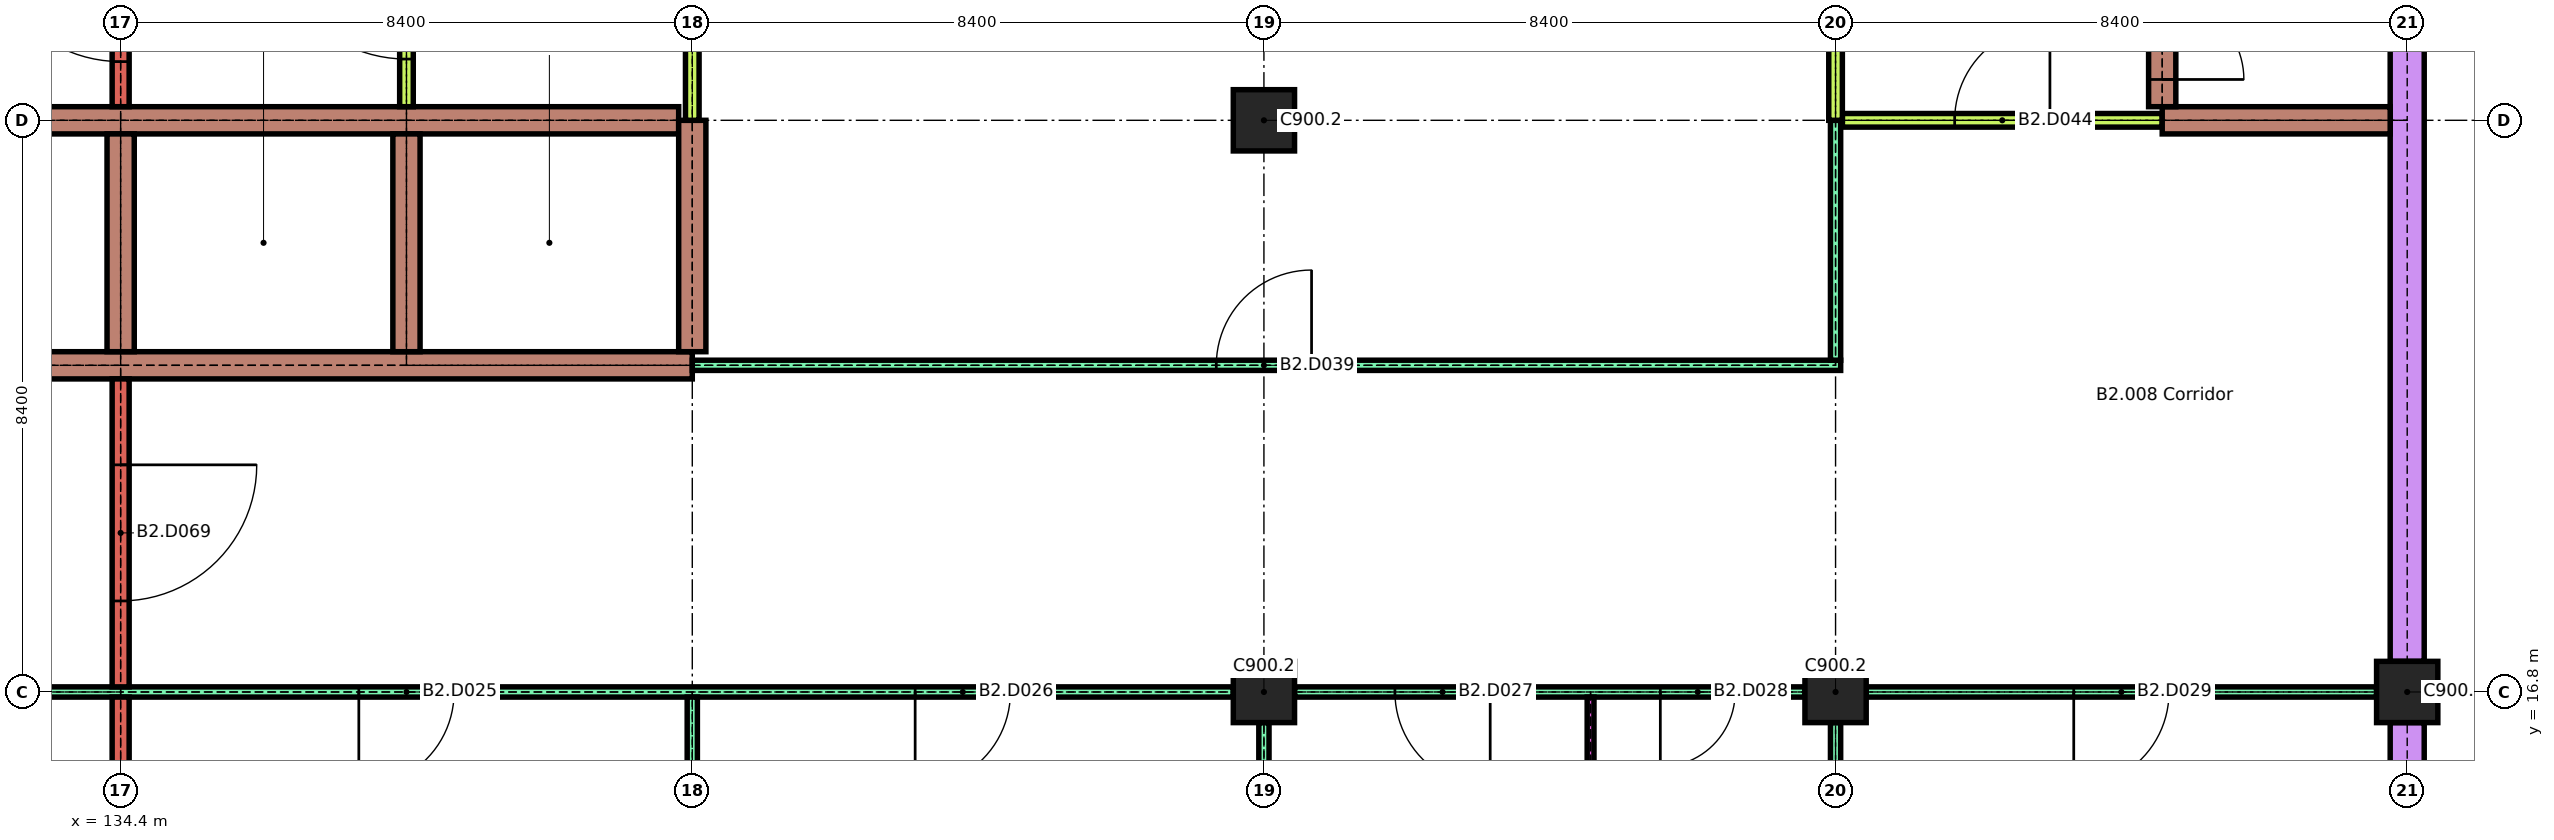
"""IFC4 building model, lengths in metres.
Left out: names, types, materials, properties, quantities, classifications, styles, units other than length and angle.
Written with IfcOpenShell. Run it as: python <this file> out.ifc"""

import sys

from ifc_helpers import new_model, si_unit, direction, frame, frame_2d, origin, origin_2d, place, context, subcontext, project, spatial, rectangle, extrude, element, fill, save


model = new_model("IFC4")
c1 = context("Model", 3, precision=1e-05, world=origin(), true_north=direction((0.0, 1.0)))
c2 = subcontext(c1, "Body", "Model", "MODEL_VIEW")
j1 = project(units=[si_unit("LENGTHUNIT", "METRE"), si_unit("PLANEANGLEUNIT", "RADIAN")], contexts=[c1])
p1 = place(None, origin())
s1 = spatial("IfcSite", under=j1, at=p1, CompositionType="ELEMENT")
p2 = place(p1, origin())
s2 = spatial("IfcBuilding", under=s1, at=p2, CompositionType="ELEMENT")
p3 = place(p2, frame((0.0, 0.0, -7.8)))
s3 = spatial("IfcBuildingStorey", under=s2, at=p3, CompositionType="ELEMENT", Elevation=-7.8)
for number, where, z_axis, x_axis in (
    (1, (151.2, 16.8, 0.0), (0.0, 0.0, 1.0), (1.0, 0.0, 0.0)),
    (2, (159.6, 16.8, 0.0), (0.0, 0.0, 1.0), (1.0, 0.0, 0.0)),
    (3, (168.0, 16.8, 0.0), (0.0, 0.0, 1.0), (1.0, 0.0, 0.0)),
    (4, (151.2, 25.2, 0.0), (0.0, 0.0, 1.0), (1.0, 0.0, 0.0)),
):
    element("IfcColumn", number, at=place(p3, frame(where, z_axis=z_axis, x_axis=x_axis)), inside=s3, PredefinedType="COLUMN", context=c2, shape_type="SweptSolid", body=[
        extrude(rectangle(XDim=0.9, YDim=0.9, at=origin_2d()), origin(), (0.0, 0.0, 1.0), 3.1),
    ])
p4 = place(p3, frame((168.0, 8.85, 0.0), z_axis=(0.0, 0.0, 1.0), x_axis=(0.0, 1.0, 0.0)))
e5 = element("IfcWall", 5, at=p4, inside=s3, PredefinedType="SOLIDWALL", context=c2, shape_type="SweptSolid", body=[
    extrude(rectangle(XDim=7.5, YDim=0.5, at=frame_2d((3.75, 0.0))), origin(), (0.0, 0.0, 1.0), 3.1),
])
p5 = place(p3, frame((168.0, 17.25, 0.0), z_axis=(0.0, 0.0, 1.0), x_axis=(0.0, 1.0, 0.0)))
e6 = element("IfcWall", 6, at=p5, inside=s3, PredefinedType="SOLIDWALL", context=c2, shape_type="SweptSolid", body=[
    extrude(rectangle(XDim=16.6, YDim=0.5, at=frame_2d((8.3, 0.0))), origin(), (0.0, 0.0, 1.0), 3.1),
])
p6 = place(p3, frame((126.0, 16.8, 0.0), z_axis=(0.0, 0.0, 1.0), x_axis=(1.0, 0.0, 0.0)))
e7 = element("IfcWall", 7, at=p6, inside=s3, PredefinedType="PARTITIONING", context=c2, shape_type="SweptSolid", body=[
    extrude(rectangle(XDim=24.75, YDim=0.15, at=frame_2d((12.375, 0.0))), origin(), (0.0, 0.0, 1.0), 3.1),
])
p7 = place(p6, frame((3.5, 0.0, 0.0)))
e8 = element("IfcOpeningElement", 8, at=p7, cuts=e7, PredefinedType="OPENING", context=c2, shape_type="SweptSolid", body=[
    extrude(rectangle(XDim=1.4, YDim=2.1, at=frame_2d((0.7, 1.05))), frame((0.0, 0.085, 0.0), z_axis=(0.0, -1.0, 0.0), x_axis=(1.0, 0.0, 0.0)), (0.0, 0.0, 1.0), 0.17),
])
p8 = place(p6, frame((11.9, 0.0, 0.0)))
e9 = element("IfcOpeningElement", 9, at=p8, cuts=e7, PredefinedType="OPENING", context=c2, shape_type="SweptSolid", body=[
    extrude(rectangle(XDim=1.4, YDim=2.1, at=frame_2d((0.7, 1.05))), frame((0.0, 0.085, 0.0), z_axis=(0.0, -1.0, 0.0), x_axis=(1.0, 0.0, 0.0)), (0.0, 0.0, 1.0), 0.17),
])
p9 = place(p6, frame((20.075, 0.0, 0.0)))
e10 = element("IfcOpeningElement", 10, at=p9, cuts=e7, PredefinedType="OPENING", context=c2, shape_type="SweptSolid", body=[
    extrude(rectangle(XDim=1.4, YDim=2.1, at=frame_2d((0.7, 1.05))), frame((0.0, 0.085, 0.0), z_axis=(0.0, -1.0, 0.0), x_axis=(1.0, 0.0, 0.0)), (0.0, 0.0, 1.0), 0.17),
])
p10 = place(p3, frame((151.65, 16.8, 0.0), z_axis=(0.0, 0.0, 1.0), x_axis=(1.0, 0.0, 0.0)))
e11 = element("IfcWall", 11, at=p10, inside=s3, PredefinedType="PARTITIONING", context=c2, shape_type="SweptSolid", body=[
    extrude(rectangle(XDim=7.5, YDim=0.15, at=frame_2d((3.75, 0.0))), origin(), (0.0, 0.0, 1.0), 3.1),
])
p11 = place(p10, frame((1.475, 0.0, 0.0)))
e12 = element("IfcOpeningElement", 12, at=p11, cuts=e11, PredefinedType="OPENING", context=c2, shape_type="SweptSolid", body=[
    extrude(rectangle(XDim=1.4, YDim=2.1, at=frame_2d((0.7, 1.05))), frame((0.0, 0.085, 0.0), z_axis=(0.0, -1.0, 0.0), x_axis=(1.0, 0.0, 0.0)), (0.0, 0.0, 1.0), 0.17),
])
p12 = place(p10, frame((5.375, 0.0, 0.0)))
e13 = element("IfcOpeningElement", 13, at=p12, cuts=e11, PredefinedType="OPENING", context=c2, shape_type="SweptSolid", body=[
    extrude(rectangle(XDim=1.1, YDim=2.1, at=frame_2d((0.55, 1.05))), frame((0.0, 0.085, 0.0), z_axis=(0.0, -1.0, 0.0), x_axis=(1.0, 0.0, 0.0)), (0.0, 0.0, 1.0), 0.17),
])
p13 = place(p3, frame((160.05, 16.8, 0.0), z_axis=(0.0, 0.0, 1.0), x_axis=(1.0, 0.0, 0.0)))
e14 = element("IfcWall", 14, at=p13, inside=s3, PredefinedType="PARTITIONING", context=c2, shape_type="SweptSolid", body=[
    extrude(rectangle(XDim=7.5, YDim=0.15, at=frame_2d((3.75, 0.0))), origin(), (0.0, 0.0, 1.0), 3.1),
])
p14 = place(p13, frame((3.05, 0.0, 0.0)))
e15 = element("IfcOpeningElement", 15, at=p14, cuts=e14, PredefinedType="OPENING", context=c2, shape_type="SweptSolid", body=[
    extrude(rectangle(XDim=1.4, YDim=2.1, at=frame_2d((0.7, 1.05))), frame((0.0, 0.085, 0.0), z_axis=(0.0, -1.0, 0.0), x_axis=(1.0, 0.0, 0.0)), (0.0, 0.0, 1.0), 0.17),
])
p15 = place(p3, frame((117.8, 21.6, 0.0), z_axis=(0.0, 0.0, 1.0), x_axis=(1.0, 0.0, 0.0)))
e16 = element("IfcWall", 16, at=p15, inside=s3, PredefinedType="SHEAR", context=c2, shape_type="SweptSolid", body=[
    extrude(rectangle(XDim=25.0, YDim=0.4, at=frame_2d((12.5, 0.0))), origin(), (0.0, 0.0, 1.0), 3.1),
])
p16 = place(p15, frame((1.45, 0.0, 0.0)))
e17 = element("IfcOpeningElement", 17, at=p16, cuts=e16, PredefinedType="OPENING", context=c2, shape_type="SweptSolid", body=[
    extrude(rectangle(XDim=1.1, YDim=2.1, at=frame_2d((0.55, 1.05))), frame((0.0, 0.21, 0.0), z_axis=(0.0, -1.0, 0.0), x_axis=(1.0, 0.0, 0.0)), (0.0, 0.0, 1.0), 0.42),
])
p17 = place(p15, frame((5.55, 0.0, 0.0)))
e18 = element("IfcOpeningElement", 18, at=p17, cuts=e16, PredefinedType="OPENING", context=c2, shape_type="SweptSolid", body=[
    extrude(rectangle(XDim=1.1, YDim=2.1, at=frame_2d((0.55, 1.05))), frame((0.0, 0.21, 0.0), z_axis=(0.0, -1.0, 0.0), x_axis=(1.0, 0.0, 0.0)), (0.0, 0.0, 1.0), 0.42),
])
p18 = place(p3, frame((142.8, 21.6, 0.0), z_axis=(0.0, 0.0, 1.0), x_axis=(1.0, 0.0, 0.0)))
e19 = element("IfcWall", 19, at=p18, inside=s3, PredefinedType="PARTITIONING", context=c2, shape_type="SweptSolid", body=[
    extrude(rectangle(XDim=16.875, YDim=0.15, at=frame_2d((8.438, 0.0))), origin(), (0.0, 0.0, 1.0), 3.1),
])
p19 = place(p18, frame((7.7, 0.0, 0.0)))
e20 = element("IfcOpeningElement", 20, at=p19, cuts=e19, PredefinedType="OPENING", context=c2, shape_type="SweptSolid", body=[
    extrude(rectangle(XDim=1.4, YDim=2.1, at=frame_2d((0.7, 1.05))), frame((0.0, 0.085, 0.0), z_axis=(0.0, -1.0, 0.0), x_axis=(1.0, 0.0, 0.0)), (0.0, 0.0, 1.0), 0.17),
])
p20 = place(p3, frame((117.8, 25.2, 0.0), z_axis=(0.0, 0.0, 1.0), x_axis=(1.0, 0.0, 0.0)))
e21 = element("IfcWall", 21, at=p20, inside=s3, PredefinedType="SHEAR", context=c2, shape_type="SweptSolid", body=[
    extrude(rectangle(XDim=24.8, YDim=0.4, at=frame_2d((12.4, 0.0))), origin(), (0.0, 0.0, 1.0), 3.1),
])
p21 = place(p3, frame((159.7, 25.2, 0.0), z_axis=(0.0, 0.0, 1.0), x_axis=(1.0, 0.0, 0.0)))
e22 = element("IfcWall", 22, at=p21, inside=s3, PredefinedType="PARTITIONING", context=c2, shape_type="SweptSolid", body=[
    extrude(rectangle(XDim=4.7, YDim=0.2, at=frame_2d((2.35, 0.0))), origin(), (0.0, 0.0, 1.0), 3.1),
])
p22 = place(p21, frame((1.65, 0.0, 0.0)))
e23 = element("IfcOpeningElement", 23, at=p22, cuts=e22, PredefinedType="OPENING", context=c2, shape_type="SweptSolid", body=[
    extrude(rectangle(XDim=1.4, YDim=2.1, at=frame_2d((0.7, 1.05))), frame((0.0, 0.11, 0.0), z_axis=(0.0, -1.0, 0.0), x_axis=(1.0, 0.0, 0.0)), (0.0, 0.0, 1.0), 0.22),
])
p23 = place(p3, frame((164.4, 25.2, 0.0), z_axis=(0.0, 0.0, 1.0), x_axis=(1.0, 0.0, 0.0)))
e24 = element("IfcWall", 24, at=p23, inside=s3, PredefinedType="SHEAR", context=c2, shape_type="SweptSolid", body=[
    extrude(rectangle(XDim=3.35, YDim=0.4, at=frame_2d((1.675, 0.0))), origin(), (0.0, 0.0, 1.0), 3.1),
])
p24 = place(p3, frame((134.4, 8.85, 0.0), z_axis=(0.0, 0.0, 1.0), x_axis=(0.0, 1.0, 0.0)))
e25 = element("IfcWall", 25, at=p24, inside=s3, PredefinedType="SOLIDWALL", context=c2, shape_type="SweptSolid", body=[
    extrude(rectangle(XDim=7.875, YDim=0.25, at=frame_2d((3.938, 0.0))), origin(), (0.0, 0.0, 1.0), 3.1),
])
p25 = place(p3, frame((134.4, 16.875, 0.0), z_axis=(0.0, 0.0, 1.0), x_axis=(0.0, 1.0, 0.0)))
e26 = element("IfcWall", 26, at=p25, inside=s3, PredefinedType="SOLIDWALL", context=c2, shape_type="SweptSolid", body=[
    extrude(rectangle(XDim=4.525, YDim=0.25, at=frame_2d((2.262, 0.0))), origin(), (0.0, 0.0, 1.0), 3.1),
])
p26 = place(p25, frame((1.262, 0.0, 0.0)))
e27 = element("IfcOpeningElement", 27, at=p26, cuts=e26, PredefinedType="OPENING", context=c2, shape_type="SweptSolid", body=[
    extrude(rectangle(XDim=2.0, YDim=2.4, at=frame_2d((1.0, 1.2))), frame((0.0, 0.135, 0.0), z_axis=(0.0, -1.0, 0.0), x_axis=(1.0, 0.0, 0.0)), (0.0, 0.0, 1.0), 0.27),
])
p27 = place(p3, frame((134.4, 21.8, 0.0), z_axis=(0.0, 0.0, 1.0), x_axis=(0.0, 1.0, 0.0)))
e28 = element("IfcWall", 28, at=p27, inside=s3, PredefinedType="SHEAR", context=c2, shape_type="SweptSolid", body=[
    extrude(rectangle(XDim=3.2, YDim=0.4, at=frame_2d((1.6, 0.0))), origin(), (0.0, 0.0, 1.0), 3.1),
])
p28 = place(p3, frame((134.4, 25.4, 0.0), z_axis=(0.0, 0.0, 1.0), x_axis=(0.0, 1.0, 0.0)))
e29 = element("IfcWall", 29, at=p28, inside=s3, PredefinedType="SOLIDWALL", context=c2, shape_type="SweptSolid", body=[
    extrude(rectangle(XDim=3.325, YDim=0.25, at=frame_2d((1.663, 0.0))), origin(), (0.0, 0.0, 1.0), 3.1),
])
p29 = place(p28, frame((0.663, 0.0, 0.0)))
e30 = element("IfcOpeningElement", 30, at=p29, cuts=e29, PredefinedType="OPENING", context=c2, shape_type="SweptSolid", body=[
    extrude(rectangle(XDim=2.0, YDim=2.4, at=frame_2d((1.0, 1.2))), frame((0.0, 0.135, 0.0), z_axis=(0.0, -1.0, 0.0), x_axis=(1.0, 0.0, 0.0)), (0.0, 0.0, 1.0), 0.27),
])
p30 = place(p3, frame((138.6, 21.8, 0.0), z_axis=(0.0, 0.0, 1.0), x_axis=(0.0, 1.0, 0.0)))
e31 = element("IfcWall", 31, at=p30, inside=s3, PredefinedType="SHEAR", context=c2, shape_type="SweptSolid", body=[
    extrude(rectangle(XDim=3.2, YDim=0.4, at=frame_2d((1.6, 0.0))), origin(), (0.0, 0.0, 1.0), 3.1),
])
p31 = place(p3, frame((138.6, 25.4, 0.0), z_axis=(0.0, 0.0, 1.0), x_axis=(0.0, 1.0, 0.0)))
e32 = element("IfcWall", 32, at=p31, inside=s3, PredefinedType="PARTITIONING", context=c2, shape_type="SweptSolid", body=[
    extrude(rectangle(XDim=4.6, YDim=0.2, at=frame_2d((2.3, 0.0))), origin(), (0.0, 0.0, 1.0), 3.1),
])
p32 = place(p31, frame((0.7, 0.0, 0.0)))
e33 = element("IfcOpeningElement", 33, at=p32, cuts=e32, PredefinedType="OPENING", context=c2, shape_type="SweptSolid", body=[
    extrude(rectangle(XDim=2.0, YDim=2.4, at=frame_2d((1.0, 1.2))), frame((0.0, 0.11, 0.0), z_axis=(0.0, -1.0, 0.0), x_axis=(1.0, 0.0, 0.0)), (0.0, 0.0, 1.0), 0.22),
])
p33 = place(p3, frame((142.8, 8.85, 0.0), z_axis=(0.0, 0.0, 1.0), x_axis=(0.0, 1.0, 0.0)))
e34 = element("IfcWall", 34, at=p33, inside=s3, PredefinedType="PARTITIONING", context=c2, shape_type="SweptSolid", body=[
    extrude(rectangle(XDim=7.875, YDim=0.15, at=frame_2d((3.938, 0.0))), origin(), (0.0, 0.0, 1.0), 3.1),
])
p34 = place(p3, frame((142.8, 21.8, 0.0), z_axis=(0.0, 0.0, 1.0), x_axis=(0.0, 1.0, 0.0)))
e35 = element("IfcWall", 35, at=p34, inside=s3, PredefinedType="SHEAR", context=c2, shape_type="SweptSolid", body=[
    extrude(rectangle(XDim=3.4, YDim=0.4, at=frame_2d((1.7, 0.0))), origin(), (0.0, 0.0, 1.0), 3.1),
])
p35 = place(p3, frame((142.8, 25.2, 0.0), z_axis=(0.0, 0.0, 1.0), x_axis=(0.0, 1.0, 0.0)))
e36 = element("IfcWall", 36, at=p35, inside=s3, PredefinedType="PARTITIONING", context=c2, shape_type="SweptSolid", body=[
    extrude(rectangle(XDim=4.8, YDim=0.2, at=frame_2d((2.4, 0.0))), origin(), (0.0, 0.0, 1.0), 3.1),
])
p36 = place(p3, frame((151.2, 8.85, 0.0), z_axis=(0.0, 0.0, 1.0), x_axis=(0.0, 1.0, 0.0)))
e37 = element("IfcWall", 37, at=p36, inside=s3, PredefinedType="PARTITIONING", context=c2, shape_type="SweptSolid", body=[
    extrude(rectangle(XDim=7.5, YDim=0.15, at=frame_2d((3.75, 0.0))), origin(), (0.0, 0.0, 1.0), 3.1),
])
p37 = place(p3, frame((156.0, 13.25, 0.0), z_axis=(0.0, 0.0, 1.0), x_axis=(0.0, 1.0, 0.0)))
e38 = element("IfcWall", 38, at=p37, inside=s3, PredefinedType="PARTITIONING", context=c2, shape_type="SweptSolid", body=[
    extrude(rectangle(XDim=3.475, YDim=0.1, at=frame_2d((1.738, 0.0))), origin(), (0.0, 0.0, 1.0), 3.1),
])
p38 = place(p3, frame((159.6, 8.85, 0.0), z_axis=(0.0, 0.0, 1.0), x_axis=(0.0, 1.0, 0.0)))
e39 = element("IfcWall", 39, at=p38, inside=s3, PredefinedType="PARTITIONING", context=c2, shape_type="SweptSolid", body=[
    extrude(rectangle(XDim=7.5, YDim=0.15, at=frame_2d((3.75, 0.0))), origin(), (0.0, 0.0, 1.0), 3.1),
])
p39 = place(p3, frame((159.6, 21.675, 0.0), z_axis=(0.0, 0.0, 1.0), x_axis=(0.0, 1.0, 0.0)))
e40 = element("IfcWall", 40, at=p39, inside=s3, PredefinedType="PARTITIONING", context=c2, shape_type="SweptSolid", body=[
    extrude(rectangle(XDim=3.525, YDim=0.15, at=frame_2d((1.762, 0.0))), origin(), (0.0, 0.0, 1.0), 3.1),
])
p40 = place(p3, frame((159.6, 25.2, 0.0), z_axis=(0.0, 0.0, 1.0), x_axis=(0.0, 1.0, 0.0)))
e41 = element("IfcWall", 41, at=p40, inside=s3, PredefinedType="PARTITIONING", context=c2, shape_type="SweptSolid", body=[
    extrude(rectangle(XDim=8.15, YDim=0.2, at=frame_2d((4.075, 0.0))), origin(), (0.0, 0.0, 1.0), 3.1),
])
p41 = place(p3, frame((164.4, 25.4, 0.0), z_axis=(0.0, 0.0, 1.0), x_axis=(0.0, 1.0, 0.0)))
e42 = element("IfcWall", 42, at=p41, inside=s3, PredefinedType="SHEAR", context=c2, shape_type="SweptSolid", body=[
    extrude(rectangle(XDim=7.95, YDim=0.4, at=frame_2d((3.975, 0.0))), origin(), (0.0, 0.0, 1.0), 3.1),
])
p42 = place(p41, frame((0.4, 0.0, 0.0)))
e43 = element("IfcOpeningElement", 43, at=p42, cuts=e42, PredefinedType="OPENING", context=c2, shape_type="SweptSolid", body=[
    extrude(rectangle(XDim=1.2, YDim=2.1, at=frame_2d((0.6, 1.05))), frame((0.0, 0.21, 0.0), z_axis=(0.0, -1.0, 0.0), x_axis=(1.0, 0.0, 0.0)), (0.0, 0.0, 1.0), 0.42),
])
p43 = place(p8, origin())
e44 = element("IfcDoor", 44, at=p43, inside=s3, OperationType="SINGLE_SWING_LEFT", PredefinedType="DOOR", context=c2, shape_type="SweptSolid", body=[
    extrude(rectangle(XDim=1.4, YDim=2.1, at=frame_2d((0.7, 1.05))), frame((0.0, 0.025, 0.0), z_axis=(0.0, -1.0, 0.0), x_axis=(1.0, 0.0, 0.0)), (0.0, 0.0, 1.0), 0.05),
])
fill(e9, e44)
p44 = place(p9, origin())
e45 = element("IfcDoor", 45, at=p44, inside=s3, OperationType="SINGLE_SWING_LEFT", PredefinedType="DOOR", context=c2, shape_type="SweptSolid", body=[
    extrude(rectangle(XDim=1.4, YDim=2.1, at=frame_2d((0.7, 1.05))), frame((0.0, 0.025, 0.0), z_axis=(0.0, -1.0, 0.0), x_axis=(1.0, 0.0, 0.0)), (0.0, 0.0, 1.0), 0.05),
])
fill(e10, e45)
p45 = place(p11, origin())
e46 = element("IfcDoor", 46, at=p45, inside=s3, OperationType="SINGLE_SWING_RIGHT", PredefinedType="DOOR", context=c2, shape_type="SweptSolid", body=[
    extrude(rectangle(XDim=1.4, YDim=2.1, at=frame_2d((0.7, 1.05))), frame((0.0, 0.025, 0.0), z_axis=(0.0, -1.0, 0.0), x_axis=(1.0, 0.0, 0.0)), (0.0, 0.0, 1.0), 0.05),
])
fill(e12, e46)
p46 = place(p12, origin())
e47 = element("IfcDoor", 47, at=p46, inside=s3, OperationType="SINGLE_SWING_LEFT", PredefinedType="DOOR", context=c2, shape_type="SweptSolid", body=[
    extrude(rectangle(XDim=1.1, YDim=2.1, at=frame_2d((0.55, 1.05))), frame((0.0, 0.025, 0.0), z_axis=(0.0, -1.0, 0.0), x_axis=(1.0, 0.0, 0.0)), (0.0, 0.0, 1.0), 0.05),
])
fill(e13, e47)
p47 = place(p14, origin())
e48 = element("IfcDoor", 48, at=p47, inside=s3, OperationType="SINGLE_SWING_LEFT", PredefinedType="DOOR", context=c2, shape_type="SweptSolid", body=[
    extrude(rectangle(XDim=1.4, YDim=2.1, at=frame_2d((0.7, 1.05))), frame((0.0, 0.025, 0.0), z_axis=(0.0, -1.0, 0.0), x_axis=(1.0, 0.0, 0.0)), (0.0, 0.0, 1.0), 0.05),
])
fill(e15, e48)
p48 = place(p19, origin())
e49 = element("IfcDoor", 49, at=p48, inside=s3, OperationType="SINGLE_SWING_LEFT", PredefinedType="DOOR", context=c2, shape_type="SweptSolid", body=[
    extrude(rectangle(XDim=1.4, YDim=2.1, at=frame_2d((0.7, 1.05))), frame((0.0, 0.025, 0.0), z_axis=(0.0, -1.0, 0.0), x_axis=(1.0, 0.0, 0.0)), (0.0, 0.0, 1.0), 0.05),
])
fill(e20, e49)
p49 = place(p22, origin())
e50 = element("IfcDoor", 50, at=p49, inside=s3, OperationType="SINGLE_SWING_LEFT", PredefinedType="DOOR", context=c2, shape_type="SweptSolid", body=[
    extrude(rectangle(XDim=1.4, YDim=2.1, at=frame_2d((0.7, 1.05))), frame((0.0, 0.03, 0.0), z_axis=(0.0, -1.0, 0.0), x_axis=(1.0, 0.0, 0.0)), (0.0, 0.0, 1.0), 0.06),
])
fill(e23, e50)
p50 = place(p26, origin())
e51 = element("IfcDoor", 51, at=p50, inside=s3, OperationType="SINGLE_SWING_RIGHT", PredefinedType="DOOR", context=c2, shape_type="SweptSolid", body=[
    extrude(rectangle(XDim=2.0, YDim=2.4, at=frame_2d((1.0, 1.2))), frame((0.0, 0.03, 0.0), z_axis=(0.0, -1.0, 0.0), x_axis=(1.0, 0.0, 0.0)), (0.0, 0.0, 1.0), 0.06),
])
fill(e27, e51)
p51 = place(p29, origin())
e52 = element("IfcDoor", 52, at=p51, inside=s3, OperationType="SINGLE_SWING_LEFT", PredefinedType="DOOR", context=c2, shape_type="SweptSolid", body=[
    extrude(rectangle(XDim=2.0, YDim=2.4, at=frame_2d((1.0, 1.2))), frame((0.0, 0.03, 0.0), z_axis=(0.0, -1.0, 0.0), x_axis=(1.0, 0.0, 0.0)), (0.0, 0.0, 1.0), 0.06),
])
fill(e30, e52)
p52 = place(p32, origin())
e53 = element("IfcDoor", 53, at=p52, inside=s3, OperationType="SINGLE_SWING_LEFT", PredefinedType="DOOR", context=c2, shape_type="SweptSolid", body=[
    extrude(rectangle(XDim=2.0, YDim=2.4, at=frame_2d((1.0, 1.2))), frame((0.0, 0.03, 0.0), z_axis=(0.0, -1.0, 0.0), x_axis=(1.0, 0.0, 0.0)), (0.0, 0.0, 1.0), 0.06),
])
fill(e33, e53)
p53 = place(p42, origin())
e54 = element("IfcDoor", 54, at=p53, inside=s3, OperationType="SINGLE_SWING_LEFT", PredefinedType="DOOR", context=c2, shape_type="SweptSolid", body=[
    extrude(rectangle(XDim=1.2, YDim=2.1, at=frame_2d((0.6, 1.05))), frame((0.0, 0.025, 0.0), z_axis=(0.0, -1.0, 0.0), x_axis=(1.0, 0.0, 0.0)), (0.0, 0.0, 1.0), 0.05),
])
fill(e43, e54)
save(model, sys.argv[1])
